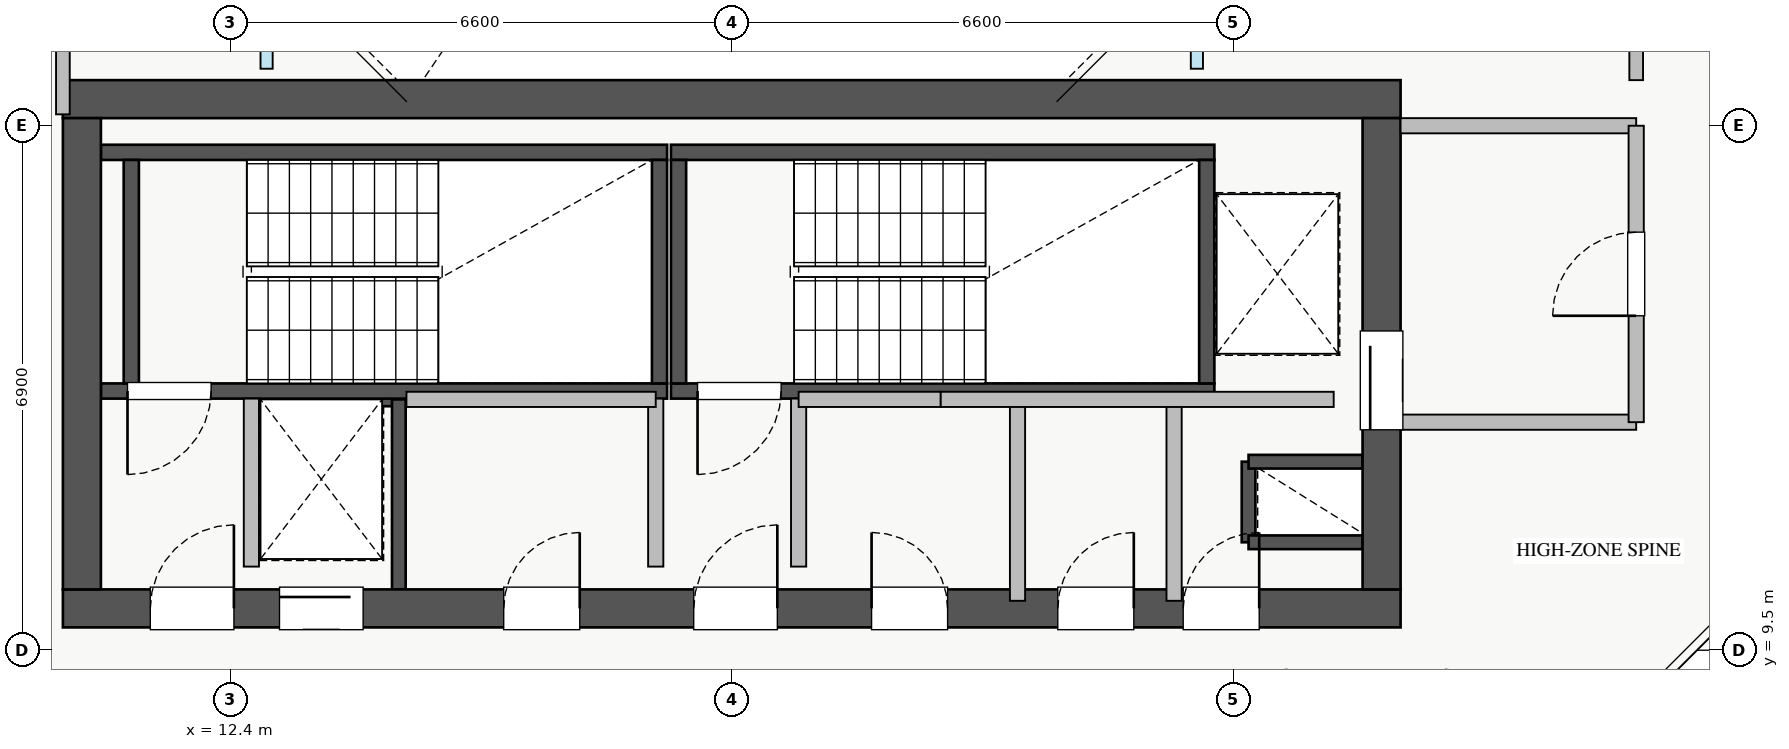
"""IFC4 building model, lengths in metres.
Left out: names, types, materials, properties, quantities, classifications, styles, units other than length and angle.
Written with IfcOpenShell. Run it as: python <this file> out.ifc"""

import sys

from ifc_helpers import new_model, si_unit, direction, frame, frame_2d, origin, place, context, subcontext, project, spatial, rectangle, extrude, source, transform, mapped, element, fill, save


model = new_model("IFC4")
c1 = context("Model", 3, precision=1e-05, world=origin(), true_north=direction((0.0, 1.0)))
c2 = subcontext(c1, "Body", "Model", "MODEL_VIEW")
j1 = project(units=[si_unit("LENGTHUNIT", "METRE"), si_unit("PLANEANGLEUNIT", "RADIAN")], contexts=[c1])
p1 = place(None, origin())
s1 = spatial("IfcSite", under=j1, at=p1, CompositionType="ELEMENT")
p2 = place(p1, origin())
s2 = spatial("IfcBuilding", under=s1, at=p2, CompositionType="ELEMENT")
p3 = place(p2, frame((0.0, 0.0, 229.5)))
s3 = spatial("IfcBuildingStorey", under=s2, at=p3, CompositionType="ELEMENT", Elevation=229.5)
p4 = place(p3, frame((12.68, 12.8, 0.0), z_axis=(0.0, 0.0, 1.0), x_axis=(1.0, 0.0, 0.0)))
e1 = element("IfcWall", 1, at=p4, inside=s3, PredefinedType="SHEAR", context=c2, shape_type="SweptSolid", body=[
    extrude(rectangle(XDim=1.94, YDim=0.18, at=frame_2d((0.97, 0.0))), origin(), (0.0, 0.0, 1.0), 3.03),
])
p5 = place(p3, frame((14.62, 10.3, 0.0), z_axis=(0.0, 0.0, 1.0), x_axis=(0.0, 1.0, 0.0)))
e2 = element("IfcWall", 2, at=p5, inside=s3, PredefinedType="SHEAR", context=c2, shape_type="SweptSolid", body=[
    extrude(rectangle(XDim=2.5, YDim=0.18, at=frame_2d((1.25, 0.0))), origin(), (0.0, 0.0, 1.0), 3.03),
])
p6 = place(p3, frame((25.8, 10.92, 0.0), z_axis=(0.0, 0.0, 1.0), x_axis=(0.0, 1.0, 0.0)))
e3 = element("IfcWall", 3, at=p6, inside=s3, PredefinedType="SHEAR", context=c2, shape_type="SweptSolid", body=[
    extrude(rectangle(XDim=1.06, YDim=0.18, at=frame_2d((0.53, 0.0))), origin(), (0.0, 0.0, 1.0), 3.03),
])
for number, where, z_axis, x_axis in (
    (4, (25.8, 11.98, 0.0), (0.0, 0.0, 1.0), (1.0, 0.0, 0.0)),
    (5, (25.8, 10.92, 0.0), (0.0, 0.0, 1.0), (1.0, 0.0, 0.0)),
):
    element("IfcWall", number, at=place(p3, frame(where, z_axis=z_axis, x_axis=x_axis)), inside=s3, PredefinedType="SHEAR", context=c2, shape_type="SweptSolid", body=[
        extrude(rectangle(XDim=1.5, YDim=0.18, at=frame_2d((0.75, 0.0))), origin(), (0.0, 0.0, 1.0), 3.03),
    ])
p7 = place(p3, frame((10.7, 12.91, 0.0), z_axis=(0.0, 0.0, 1.0), x_axis=(1.0, 0.0, 0.0)))
e6 = element("IfcWall", 6, at=p7, inside=s3, PredefinedType="SHEAR", context=c2, shape_type="SweptSolid", body=[
    extrude(rectangle(XDim=7.45, YDim=0.2, at=frame_2d((3.725, 0.0))), origin(), (0.0, 0.0, 1.0), 3.25),
])
p8 = place(p7, frame((0.35, 0.0, 0.0)))
e7 = element("IfcOpeningElement", 7, at=p8, cuts=e6, PredefinedType="OPENING", context=c2, shape_type="SweptSolid", body=[
    extrude(rectangle(XDim=1.1, YDim=2.05, at=frame_2d((0.55, 1.025))), frame((0.0, 0.11, 0.0), z_axis=(0.0, -1.0, 0.0), x_axis=(1.0, 0.0, 0.0)), (0.0, 0.0, 1.0), 0.22),
])
p9 = place(p3, frame((10.7, 16.05, 0.0), z_axis=(0.0, 0.0, 1.0), x_axis=(1.0, 0.0, 0.0)))
e8 = element("IfcWall", 8, at=p9, inside=s3, PredefinedType="SHEAR", context=c2, shape_type="SweptSolid", body=[
    extrude(rectangle(XDim=7.45, YDim=0.2, at=frame_2d((3.725, 0.0))), origin(), (0.0, 0.0, 1.0), 3.25),
])
for number, where, z_axis, x_axis in (
    (9, (11.1, 13.01, 0.0), (0.0, 0.0, 1.0), (0.0, 1.0, 0.0)),
    (10, (18.05, 13.01, 0.0), (0.0, 0.0, 1.0), (0.0, 1.0, 0.0)),
):
    element("IfcWall", number, at=place(p3, frame(where, z_axis=z_axis, x_axis=x_axis)), inside=s3, PredefinedType="SHEAR", context=c2, shape_type="SweptSolid", body=[
        extrude(rectangle(XDim=2.94, YDim=0.2, at=frame_2d((1.47, 0.0))), origin(), (0.0, 0.0, 1.0), 3.25),
    ])
p10 = place(p3, frame((18.2, 12.91, 0.0), z_axis=(0.0, 0.0, 1.0), x_axis=(1.0, 0.0, 0.0)))
e11 = element("IfcWall", 11, at=p10, inside=s3, PredefinedType="SHEAR", context=c2, shape_type="SweptSolid", body=[
    extrude(rectangle(XDim=7.15, YDim=0.2, at=frame_2d((3.575, 0.0))), origin(), (0.0, 0.0, 1.0), 3.25),
])
p11 = place(p10, frame((0.35, 0.0, 0.0)))
e12 = element("IfcOpeningElement", 12, at=p11, cuts=e11, PredefinedType="OPENING", context=c2, shape_type="SweptSolid", body=[
    extrude(rectangle(XDim=1.1, YDim=2.05, at=frame_2d((0.55, 1.025))), frame((0.0, 0.11, 0.0), z_axis=(0.0, -1.0, 0.0), x_axis=(1.0, 0.0, 0.0)), (0.0, 0.0, 1.0), 0.22),
])
p12 = place(p3, frame((18.2, 16.05, 0.0), z_axis=(0.0, 0.0, 1.0), x_axis=(1.0, 0.0, 0.0)))
e13 = element("IfcWall", 13, at=p12, inside=s3, PredefinedType="SHEAR", context=c2, shape_type="SweptSolid", body=[
    extrude(rectangle(XDim=7.15, YDim=0.2, at=frame_2d((3.575, 0.0))), origin(), (0.0, 0.0, 1.0), 3.25),
])
for number, where, z_axis, x_axis in (
    (14, (18.3, 13.01, 0.0), (0.0, 0.0, 1.0), (0.0, 1.0, 0.0)),
    (15, (25.25, 13.01, 0.0), (0.0, 0.0, 1.0), (0.0, 1.0, 0.0)),
):
    element("IfcWall", number, at=place(p3, frame(where, z_axis=z_axis, x_axis=x_axis)), inside=s3, PredefinedType="SHEAR", context=c2, shape_type="SweptSolid", body=[
        extrude(rectangle(XDim=2.94, YDim=0.2, at=frame_2d((1.47, 0.0))), origin(), (0.0, 0.0, 1.0), 3.25),
    ])
p13 = place(p3, frame((10.2, 10.05, 0.0), z_axis=(0.0, 0.0, 1.0), x_axis=(1.0, 0.0, 0.0)))
e16 = element("IfcWall", 16, at=p13, inside=s3, PredefinedType="SHEAR", context=c2, shape_type="SweptSolid", body=[
    extrude(rectangle(XDim=17.6, YDim=0.5, at=frame_2d((8.8, 0.0))), origin(), (0.0, 0.0, 1.0), 3.25),
])
p14 = place(p13, frame((1.15, 0.0, 0.0)))
e17 = element("IfcOpeningElement", 17, at=p14, cuts=e16, PredefinedType="OPENING", context=c2, shape_type="SweptSolid", body=[
    extrude(rectangle(XDim=1.1, YDim=2.05, at=frame_2d((0.55, 1.025))), frame((0.0, 0.26, 0.0), z_axis=(0.0, -1.0, 0.0), x_axis=(1.0, 0.0, 0.0)), (0.0, 0.0, 1.0), 0.52),
])
p15 = place(p13, frame((8.3, 0.0, 0.0)))
e18 = element("IfcOpeningElement", 18, at=p15, cuts=e16, PredefinedType="OPENING", context=c2, shape_type="SweptSolid", body=[
    extrude(rectangle(XDim=1.1, YDim=2.05, at=frame_2d((0.55, 1.025))), frame((0.0, 0.26, 0.0), z_axis=(0.0, -1.0, 0.0), x_axis=(1.0, 0.0, 0.0)), (0.0, 0.0, 1.0), 0.52),
])
p16 = place(p13, frame((2.85, 0.0, 0.0)))
e19 = element("IfcOpeningElement", 19, at=p16, cuts=e16, PredefinedType="OPENING", context=c2, shape_type="SweptSolid", body=[
    extrude(rectangle(XDim=1.1, YDim=2.05, at=frame_2d((0.55, 1.025))), frame((0.0, 0.26, 0.0), z_axis=(0.0, -1.0, 0.0), x_axis=(1.0, 0.0, 0.0)), (0.0, 0.0, 1.0), 0.52),
])
p17 = place(p13, frame((5.8, 0.0, 0.0)))
e20 = element("IfcOpeningElement", 20, at=p17, cuts=e16, PredefinedType="OPENING", context=c2, shape_type="SweptSolid", body=[
    extrude(rectangle(XDim=1.0, YDim=2.05, at=frame_2d((0.5, 1.025))), frame((0.0, 0.26, 0.0), z_axis=(0.0, -1.0, 0.0), x_axis=(1.0, 0.0, 0.0)), (0.0, 0.0, 1.0), 0.52),
])
p18 = place(p13, frame((14.74, 0.0, 0.0)))
e21 = element("IfcOpeningElement", 21, at=p18, cuts=e16, PredefinedType="OPENING", context=c2, shape_type="SweptSolid", body=[
    extrude(rectangle(XDim=1.0, YDim=2.05, at=frame_2d((0.5, 1.025))), frame((0.0, 0.26, 0.0), z_axis=(0.0, -1.0, 0.0), x_axis=(1.0, 0.0, 0.0)), (0.0, 0.0, 1.0), 0.52),
])
p19 = place(p13, frame((10.64, 0.0, 0.0)))
e22 = element("IfcOpeningElement", 22, at=p19, cuts=e16, PredefinedType="OPENING", context=c2, shape_type="SweptSolid", body=[
    extrude(rectangle(XDim=1.0, YDim=2.05, at=frame_2d((0.5, 1.025))), frame((0.0, 0.26, 0.0), z_axis=(0.0, -1.0, 0.0), x_axis=(1.0, 0.0, 0.0)), (0.0, 0.0, 1.0), 0.52),
])
p20 = place(p13, frame((13.09, 0.0, 0.0)))
e23 = element("IfcOpeningElement", 23, at=p20, cuts=e16, PredefinedType="OPENING", context=c2, shape_type="SweptSolid", body=[
    extrude(rectangle(XDim=1.0, YDim=2.05, at=frame_2d((0.5, 1.025))), frame((0.0, 0.26, 0.0), z_axis=(0.0, -1.0, 0.0), x_axis=(1.0, 0.0, 0.0)), (0.0, 0.0, 1.0), 0.52),
])
p21 = place(p3, frame((10.2, 16.75, 0.0), z_axis=(0.0, 0.0, 1.0), x_axis=(1.0, 0.0, 0.0)))
e24 = element("IfcWall", 24, at=p21, inside=s3, PredefinedType="SHEAR", context=c2, shape_type="SweptSolid", body=[
    extrude(rectangle(XDim=17.6, YDim=0.5, at=frame_2d((8.8, 0.0))), origin(), (0.0, 0.0, 1.0), 3.25),
])
p22 = place(p3, frame((10.45, 10.3, 0.0), z_axis=(0.0, 0.0, 1.0), x_axis=(0.0, 1.0, 0.0)))
e25 = element("IfcWall", 25, at=p22, inside=s3, PredefinedType="SHEAR", context=c2, shape_type="SweptSolid", body=[
    extrude(rectangle(XDim=6.2, YDim=0.5, at=frame_2d((3.1, 0.0))), origin(), (0.0, 0.0, 1.0), 3.25),
])
p23 = place(p3, frame((27.55, 10.3, 0.0), z_axis=(0.0, 0.0, 1.0), x_axis=(0.0, 1.0, 0.0)))
e26 = element("IfcWall", 26, at=p23, inside=s3, PredefinedType="SHEAR", context=c2, shape_type="SweptSolid", body=[
    extrude(rectangle(XDim=6.2, YDim=0.5, at=frame_2d((3.1, 0.0))), origin(), (0.0, 0.0, 1.0), 3.25),
])
p24 = place(p23, frame((2.1, 0.0, 0.0)))
e27 = element("IfcOpeningElement", 27, at=p24, cuts=e26, PredefinedType="OPENING", context=c2, shape_type="SweptSolid", body=[
    extrude(rectangle(XDim=1.3, YDim=2.05, at=frame_2d((0.65, 1.025))), frame((0.0, 0.26, 0.0), z_axis=(0.0, -1.0, 0.0), x_axis=(1.0, 0.0, 0.0)), (0.0, 0.0, 1.0), 0.52),
])
p25 = place(p3, frame((27.8, 16.4, 0.0), z_axis=(0.0, 0.0, 1.0), x_axis=(1.0, 0.0, 0.0)))
e28 = element("IfcWall", 28, at=p25, inside=s3, PredefinedType="PARTITIONING", context=c2, shape_type="SweptSolid", body=[
    extrude(rectangle(XDim=3.1, YDim=0.2, at=frame_2d((1.55, 0.0))), origin(), (0.0, 0.0, 1.0), 3.03),
])
p26 = place(p3, frame((27.8, 12.5, 0.0), z_axis=(0.0, 0.0, 1.0), x_axis=(1.0, 0.0, 0.0)))
e29 = element("IfcWall", 29, at=p26, inside=s3, PredefinedType="PARTITIONING", context=c2, shape_type="SweptSolid", body=[
    extrude(rectangle(XDim=3.1, YDim=0.2, at=frame_2d((1.55, 0.0))), origin(), (0.0, 0.0, 1.0), 2.225),
])
p27 = place(p3, frame((30.9, 12.5, 0.0), z_axis=(0.0, 0.0, 1.0), x_axis=(0.0, 1.0, 0.0)))
e30 = element("IfcWall", 30, at=p27, inside=s3, PredefinedType="PARTITIONING", context=c2, shape_type="SweptSolid", body=[
    extrude(rectangle(XDim=3.9, YDim=0.2, at=frame_2d((1.95, 0.0))), origin(), (0.0, 0.0, 1.0), 3.03),
])
p28 = place(p27, frame((1.4, 0.0, 0.0)))
e31 = element("IfcOpeningElement", 31, at=p28, cuts=e30, PredefinedType="OPENING", context=c2, shape_type="SweptSolid", body=[
    extrude(rectangle(XDim=1.1, YDim=2.05, at=frame_2d((0.55, 1.025))), frame((0.0, 0.11, 0.0), z_axis=(0.0, -1.0, 0.0), x_axis=(1.0, 0.0, 0.0)), (0.0, 0.0, 1.0), 0.22),
])
for number, where, z_axis, x_axis in (
    (32, (12.68, 10.6, 0.0), (0.0, 0.0, 1.0), (0.0, 1.0, 0.0)),
    (33, (18.0, 10.6, 0.0), (0.0, 0.0, 1.0), (0.0, 1.0, 0.0)),
    (34, (19.88, 10.6, 0.0), (0.0, 0.0, 1.0), (0.0, 1.0, 0.0)),
):
    element("IfcWall", number, at=place(p3, frame(where, z_axis=z_axis, x_axis=x_axis)), inside=s3, PredefinedType="PARTITIONING", context=c2, shape_type="SweptSolid", body=[
        extrude(rectangle(XDim=2.21, YDim=0.2, at=frame_2d((1.105, 0.0))), origin(), (0.0, 0.0, 1.0), 3.03),
    ])
p29 = place(p3, frame((14.72, 12.8, 0.0), z_axis=(0.0, 0.0, 1.0), x_axis=(1.0, 0.0, 0.0)))
e35 = element("IfcWall", 35, at=p29, inside=s3, PredefinedType="PARTITIONING", context=c2, shape_type="SweptSolid", body=[
    extrude(rectangle(XDim=3.28, YDim=0.2, at=frame_2d((1.64, 0.0))), origin(), (0.0, 0.0, 1.0), 3.03),
])
p30 = place(p3, frame((24.82, 10.15, 0.0), z_axis=(0.0, 0.0, 1.0), x_axis=(0.0, 1.0, 0.0)))
e36 = element("IfcWall", 36, at=p30, inside=s3, PredefinedType="PARTITIONING", context=c2, shape_type="SweptSolid", body=[
    extrude(rectangle(XDim=2.65, YDim=0.2, at=frame_2d((1.325, 0.0))), origin(), (0.0, 0.0, 1.0), 3.03),
])
p31 = place(p3, frame((19.88, 12.8, 0.0), z_axis=(0.0, 0.0, 1.0), x_axis=(1.0, 0.0, 0.0)))
e37 = element("IfcWall", 37, at=p31, inside=s3, PredefinedType="PARTITIONING", context=c2, shape_type="SweptSolid", body=[
    extrude(rectangle(XDim=1.87, YDim=0.2, at=frame_2d((0.935, 0.0))), origin(), (0.0, 0.0, 1.0), 3.03),
])
p32 = place(p3, frame((22.76, 10.15, 0.0), z_axis=(0.0, 0.0, 1.0), x_axis=(0.0, 1.0, 0.0)))
e38 = element("IfcWall", 38, at=p32, inside=s3, PredefinedType="PARTITIONING", context=c2, shape_type="SweptSolid", body=[
    extrude(rectangle(XDim=2.65, YDim=0.2, at=frame_2d((1.325, 0.0))), origin(), (0.0, 0.0, 1.0), 3.03),
])
p33 = place(p3, frame((21.75, 12.8, 0.0), z_axis=(0.0, 0.0, 1.0), x_axis=(1.0, 0.0, 0.0)))
e39 = element("IfcWall", 39, at=p33, inside=s3, PredefinedType="PARTITIONING", context=c2, shape_type="SweptSolid", body=[
    extrude(rectangle(XDim=5.17, YDim=0.2, at=frame_2d((2.585, 0.0))), origin(), (0.0, 0.0, 1.0), 3.03),
])
p34 = place(p3, frame((10.2, 16.55, 0.0), z_axis=(0.0, 0.0, 1.0), x_axis=(0.0, 1.0, 0.0)))
e40 = element("IfcWall", 40, at=p34, inside=s3, PredefinedType="PARTITIONING", context=c2, shape_type="SweptSolid", body=[
    extrude(rectangle(XDim=4.45, YDim=0.18, at=frame_2d((2.225, 0.0))), origin(), (0.0, 0.0, 1.0), 3.03),
])
p35 = place(p34, frame((2.025, 0.0, 0.0)))
e41 = element("IfcOpeningElement", 41, at=p35, cuts=e40, PredefinedType="OPENING", context=c2, shape_type="SweptSolid", body=[
    extrude(rectangle(XDim=0.85, YDim=2.05, at=frame_2d((0.425, 1.025))), frame((0.0, 0.1, 0.0), z_axis=(0.0, -1.0, 0.0), x_axis=(1.0, 0.0, 0.0)), (0.0, 0.0, 1.0), 0.2),
])
p36 = place(p3, frame((30.9, 17.0, 0.0), z_axis=(0.0, 0.0, 1.0), x_axis=(0.0, 1.0, 0.0)))
e42 = element("IfcWall", 42, at=p36, inside=s3, PredefinedType="PARTITIONING", context=c2, shape_type="SweptSolid", body=[
    extrude(rectangle(XDim=12.0, YDim=0.18, at=frame_2d((6.0, 0.0))), origin(), (0.0, 0.0, 1.0), 3.03),
])
p37 = place(p36, frame((2.5, 0.0, 0.0)))
e43 = element("IfcOpeningElement", 43, at=p37, cuts=e42, PredefinedType="OPENING", context=c2, shape_type="SweptSolid", body=[
    extrude(rectangle(XDim=1.0, YDim=2.05, at=frame_2d((0.5, 1.025))), frame((0.0, 0.1, 0.0), z_axis=(0.0, -1.0, 0.0), x_axis=(1.0, 0.0, 0.0)), (0.0, 0.0, 1.0), 0.2),
])
p38 = place(p36, frame((8.5, 0.0, 0.0)))
e44 = element("IfcOpeningElement", 44, at=p38, cuts=e42, PredefinedType="OPENING", context=c2, shape_type="SweptSolid", body=[
    extrude(rectangle(XDim=1.0, YDim=2.05, at=frame_2d((0.5, 1.025))), frame((0.0, 0.1, 0.0), z_axis=(0.0, -1.0, 0.0), x_axis=(1.0, 0.0, 0.0)), (0.0, 0.0, 1.0), 0.2),
])
m1 = source(origin(), c2, "Body", "SweptSolid", [
    extrude(rectangle(XDim=1.3, YDim=2.05, at=frame_2d((0.65, 1.025))), frame((0.0, 0.025, 0.0), z_axis=(0.0, -1.0, 0.0), x_axis=(1.0, 0.0, 0.0)), (0.0, 0.0, 1.0), 0.05),
])
p39 = place(p24, origin())
e45 = element("IfcDoor", 45, at=p39, inside=s3, OperationType="SLIDING_TO_RIGHT", PredefinedType="DOOR", context=c2, shape_type="MappedRepresentation", body=[
    mapped(m1, transform((0.0, 0.0, 0.0), x_axis=(1.0, 0.0, 0.0), y_axis=(0.0, 1.0, 0.0), z_axis=(0.0, 0.0, 1.0), scale=1.0)),
])
fill(e27, e45)
m2 = source(origin(), c2, "Body", "SweptSolid", [
    extrude(rectangle(XDim=1.1, YDim=2.05, at=frame_2d((0.55, 1.025))), frame((0.0, 0.025, 0.0), z_axis=(0.0, -1.0, 0.0), x_axis=(1.0, 0.0, 0.0)), (0.0, 0.0, 1.0), 0.05),
])
p40 = place(p14, origin())
e46 = element("IfcDoor", 46, at=p40, inside=s3, OperationType="SINGLE_SWING_RIGHT", PredefinedType="DOOR", context=c2, shape_type="MappedRepresentation", body=[
    mapped(m2, transform((0.0, 0.0, 0.0), x_axis=(1.0, 0.0, 0.0), y_axis=(0.0, 1.0, 0.0), z_axis=(0.0, 0.0, 1.0), scale=1.0)),
])
fill(e17, e46)
p41 = place(p8, frame((1.1, 0.0, 0.0), z_axis=(0.0, 0.0, 1.0), x_axis=(-1.0, 0.0, 0.0)))
e47 = element("IfcDoor", 47, at=p41, inside=s3, OperationType="SINGLE_SWING_LEFT", PredefinedType="DOOR", context=c2, shape_type="MappedRepresentation", body=[
    mapped(m2, transform((0.0, 0.0, 0.0), x_axis=(1.0, 0.0, 0.0), y_axis=(0.0, 1.0, 0.0), z_axis=(0.0, 0.0, 1.0), scale=1.0)),
])
fill(e7, e47)
p42 = place(p15, origin())
e48 = element("IfcDoor", 48, at=p42, inside=s3, OperationType="SINGLE_SWING_RIGHT", PredefinedType="DOOR", context=c2, shape_type="MappedRepresentation", body=[
    mapped(m2, transform((0.0, 0.0, 0.0), x_axis=(1.0, 0.0, 0.0), y_axis=(0.0, 1.0, 0.0), z_axis=(0.0, 0.0, 1.0), scale=1.0)),
])
fill(e18, e48)
p43 = place(p11, frame((1.1, 0.0, 0.0), z_axis=(0.0, 0.0, 1.0), x_axis=(-1.0, 0.0, 0.0)))
e49 = element("IfcDoor", 49, at=p43, inside=s3, OperationType="SINGLE_SWING_LEFT", PredefinedType="DOOR", context=c2, shape_type="MappedRepresentation", body=[
    mapped(m2, transform((0.0, 0.0, 0.0), x_axis=(1.0, 0.0, 0.0), y_axis=(0.0, 1.0, 0.0), z_axis=(0.0, 0.0, 1.0), scale=1.0)),
])
fill(e12, e49)
p44 = place(p16, origin())
e50 = element("IfcDoor", 50, at=p44, inside=s3, OperationType="SLIDING_TO_RIGHT", PredefinedType="DOOR", context=c2, shape_type="MappedRepresentation", body=[
    mapped(m2, transform((0.0, 0.0, 0.0), x_axis=(1.0, 0.0, 0.0), y_axis=(0.0, 1.0, 0.0), z_axis=(0.0, 0.0, 1.0), scale=1.0)),
])
fill(e19, e50)
m3 = source(origin(), c2, "Body", "SweptSolid", [
    extrude(rectangle(XDim=1.0, YDim=2.05, at=frame_2d((0.5, 1.025))), frame((0.0, 0.025, 0.0), z_axis=(0.0, -1.0, 0.0), x_axis=(1.0, 0.0, 0.0)), (0.0, 0.0, 1.0), 0.05),
])
p45 = place(p17, origin())
e51 = element("IfcDoor", 51, at=p45, inside=s3, OperationType="SINGLE_SWING_RIGHT", PredefinedType="DOOR", context=c2, shape_type="MappedRepresentation", body=[
    mapped(m3, transform((0.0, 0.0, 0.0), x_axis=(1.0, 0.0, 0.0), y_axis=(0.0, 1.0, 0.0), z_axis=(0.0, 0.0, 1.0), scale=1.0)),
])
fill(e20, e51)
p46 = place(p18, origin())
e52 = element("IfcDoor", 52, at=p46, inside=s3, OperationType="SINGLE_SWING_RIGHT", PredefinedType="DOOR", context=c2, shape_type="MappedRepresentation", body=[
    mapped(m3, transform((0.0, 0.0, 0.0), x_axis=(1.0, 0.0, 0.0), y_axis=(0.0, 1.0, 0.0), z_axis=(0.0, 0.0, 1.0), scale=1.0)),
])
fill(e21, e52)
p47 = place(p19, origin())
e53 = element("IfcDoor", 53, at=p47, inside=s3, OperationType="SINGLE_SWING_LEFT", PredefinedType="DOOR", context=c2, shape_type="MappedRepresentation", body=[
    mapped(m3, transform((0.0, 0.0, 0.0), x_axis=(1.0, 0.0, 0.0), y_axis=(0.0, 1.0, 0.0), z_axis=(0.0, 0.0, 1.0), scale=1.0)),
])
fill(e22, e53)
p48 = place(p20, origin())
e54 = element("IfcDoor", 54, at=p48, inside=s3, OperationType="SINGLE_SWING_RIGHT", PredefinedType="DOOR", context=c2, shape_type="MappedRepresentation", body=[
    mapped(m3, transform((0.0, 0.0, 0.0), x_axis=(1.0, 0.0, 0.0), y_axis=(0.0, 1.0, 0.0), z_axis=(0.0, 0.0, 1.0), scale=1.0)),
])
fill(e23, e54)
p49 = place(p28, origin())
e55 = element("IfcDoor", 55, at=p49, inside=s3, OperationType="SINGLE_SWING_LEFT", PredefinedType="DOOR", context=c2, shape_type="MappedRepresentation", body=[
    mapped(m2, transform((0.0, 0.0, 0.0), x_axis=(1.0, 0.0, 0.0), y_axis=(0.0, 1.0, 0.0), z_axis=(0.0, 0.0, 1.0), scale=1.0)),
])
fill(e31, e55)
save(model, sys.argv[1])
